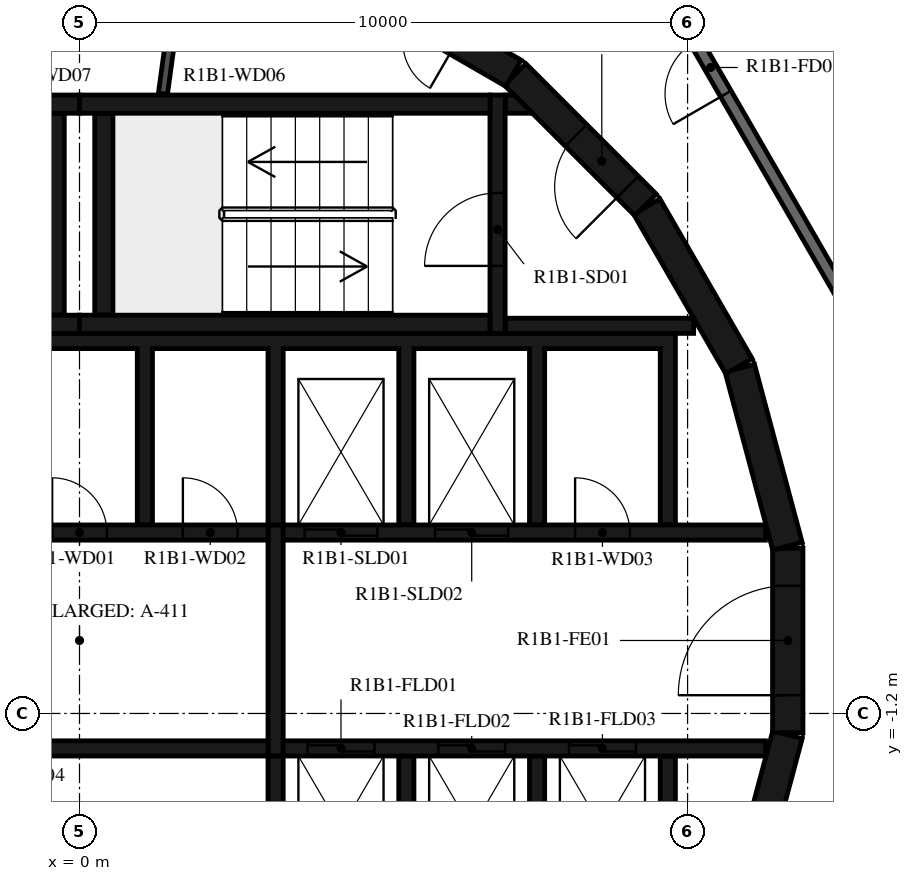
"""IFC4 building model, lengths in metres.
Left out: names, types, materials, properties, quantities, classifications, styles, units other than length and angle.
Written with IfcOpenShell. Run it as: python <this file> out.ifc"""

import sys

from ifc_helpers import new_model, si_unit, direction, frame, frame_2d, origin, place, context, subcontext, project, spatial, polyline, rectangle, outline, extrude, element, fill, save


model = new_model("IFC4")
c1 = context("Model", 3, precision=1e-05, world=origin(), true_north=direction((0.0, 1.0)))
c2 = subcontext(c1, "Body", "Model", "MODEL_VIEW")
j1 = project(units=[si_unit("LENGTHUNIT", "METRE"), si_unit("PLANEANGLEUNIT", "RADIAN")], contexts=[c1])
p1 = place(None, origin())
s1 = spatial("IfcSite", under=j1, at=p1, CompositionType="ELEMENT")
p2 = place(p1, origin())
s2 = spatial("IfcBuilding", under=s1, at=p2, CompositionType="ELEMENT")
p3 = place(p2, frame((0.0, 0.0, 48.9)))
s3 = spatial("IfcBuildingStorey", under=s2, at=p3, CompositionType="ELEMENT", Elevation=48.9)
p4 = place(p3, frame((10.858, -4.479, 0.0), z_axis=(0.0, 0.0, 1.0), x_axis=(0.258734743916, 0.965948410781, 0.0)))
e1 = element("IfcWall", 1, at=p4, inside=s3, PredefinedType="SHEAR", context=c2, shape_type="SweptSolid", body=[
    extrude(rectangle(XDim=3.033, YDim=0.5, at=frame_2d((1.516, 0.0))), origin(), (0.0, 0.0, 1.0), 3.12),
])
p5 = place(p3, frame((11.647, -1.516, 0.0), z_axis=(0.0, 0.0, 1.0), x_axis=(0.0, 1.0, 0.0)))
e2 = element("IfcWall", 2, at=p5, inside=s3, PredefinedType="SHEAR", context=c2, shape_type="SweptSolid", body=[
    extrude(rectangle(XDim=3.033, YDim=0.5, at=frame_2d((1.516, 0.0))), origin(), (0.0, 0.0, 1.0), 3.12),
])
p6 = place(p5, frame((0.616, 0.0, 0.0)))
e3 = element("IfcOpeningElement", 3, at=p6, cuts=e2, PredefinedType="OPENING", context=c2, shape_type="SweptSolid", body=[
    extrude(rectangle(XDim=1.8, YDim=2.1, at=frame_2d((0.9, 1.05))), frame((0.0, 0.26, 0.0), z_axis=(0.0, -1.0, 0.0), x_axis=(1.0, 0.0, 0.0)), (0.0, 0.0, 1.0), 0.52),
])
for number, where, z_axis, x_axis in (
    (4, (11.643, 1.55, 0.0), (0.0, 0.0, 1.0), (-0.259, 0.966, 0.0)),
    (5, (10.845, 4.51, 0.0), (0.0, 0.0, 1.0), (-0.5, 0.866, 0.0)),
):
    element("IfcWall", number, at=place(p3, frame(where, z_axis=z_axis, x_axis=x_axis)), inside=s3, PredefinedType="SHEAR", context=c2, shape_type="SweptSolid", body=[
        extrude(rectangle(XDim=3.033, YDim=0.5, at=frame_2d((1.516, 0.0))), origin(), (0.0, 0.0, 1.0), 3.12),
    ])
p7 = place(p3, frame((9.308, 7.164, 0.0), z_axis=(0.0, 0.0, 1.0), x_axis=(-0.707106781187, 0.707106781187, 0.0)))
e6 = element("IfcWall", 6, at=p7, inside=s3, PredefinedType="SHEAR", context=c2, shape_type="SweptSolid", body=[
    extrude(rectangle(XDim=3.032, YDim=0.5, at=frame_2d((1.516, 0.0))), origin(), (0.0, 0.0, 1.0), 3.12),
])
p8 = place(p7, frame((0.416, 0.0, 0.0)))
e7 = element("IfcOpeningElement", 7, at=p8, cuts=e6, PredefinedType="OPENING", context=c2, shape_type="SweptSolid", body=[
    extrude(rectangle(XDim=1.2, YDim=2.1, at=frame_2d((0.6, 1.05))), frame((0.0, 0.26, 0.0), z_axis=(0.0, -1.0, 0.0), x_axis=(1.0, 0.0, 0.0)), (0.0, 0.0, 1.0), 0.52),
])
p9 = place(p3, frame((7.137, 9.329, 0.0), z_axis=(0.0, 0.0, 1.0), x_axis=(-0.865975092491, 0.500087131594, 0.0)))
e8 = element("IfcWall", 8, at=p9, inside=s3, PredefinedType="SHEAR", context=c2, shape_type="SweptSolid", body=[
    extrude(rectangle(XDim=3.033, YDim=0.5, at=frame_2d((1.516, 0.0))), origin(), (0.0, 0.0, 1.0), 3.12),
])
p10 = place(p9, frame((1.066, 0.0, 0.0)))
e9 = element("IfcOpeningElement", 9, at=p10, cuts=e8, PredefinedType="OPENING", context=c2, shape_type="SweptSolid", body=[
    extrude(rectangle(XDim=0.9, YDim=2.1, at=frame_2d((0.45, 1.05))), frame((0.0, 0.26, 0.0), z_axis=(0.0, -1.0, 0.0), x_axis=(1.0, 0.0, 0.0)), (0.0, 0.0, 1.0), 0.52),
])
for number, where, z_axis, x_axis in (
    (10, (0.0, 5.2, 0.0), (0.0, 0.0, 1.0), (1.0, 0.0, 0.0)),
    (11, (0.0, 8.82, 0.0), (0.0, 0.0, 1.0), (1.0, 0.0, 0.0)),
):
    element("IfcWall", number, at=place(p3, frame(where, z_axis=z_axis, x_axis=x_axis)), inside=s3, PredefinedType="SHEAR", context=c2, shape_type="SweptSolid", body=[
        extrude(rectangle(XDim=6.75, YDim=0.3, at=frame_2d((3.375, 0.0))), origin(), (0.0, 0.0, 1.0), 3.12),
    ])
p11 = place(p3, frame((0.4, 5.35, 0.0), z_axis=(0.0, 0.0, 1.0), x_axis=(0.0, 1.0, 0.0)))
e12 = element("IfcWall", 12, at=p11, inside=s3, PredefinedType="SHEAR", context=c2, shape_type="SweptSolid", body=[
    extrude(rectangle(XDim=3.32, YDim=0.3, at=frame_2d((1.66, 0.0))), origin(), (0.0, 0.0, 1.0), 3.12),
])
p12 = place(p3, frame((6.875, 5.05, 0.0), z_axis=(0.0, 0.0, 1.0), x_axis=(0.0, 1.0, 0.0)))
e13 = element("IfcWall", 13, at=p12, inside=s3, PredefinedType="SHEAR", context=c2, shape_type="SweptSolid", body=[
    extrude(rectangle(XDim=3.92, YDim=0.25, at=frame_2d((1.96, 0.0))), origin(), (0.0, 0.0, 1.0), 3.12),
])
p13 = place(p12, frame((1.11, 0.0, 0.0)))
e14 = element("IfcOpeningElement", 14, at=p13, cuts=e13, PredefinedType="OPENING", context=c2, shape_type="SweptSolid", body=[
    extrude(rectangle(XDim=1.2, YDim=2.1, at=frame_2d((0.6, 1.05))), frame((0.0, 0.135, 0.0), z_axis=(0.0, -1.0, 0.0), x_axis=(1.0, 0.0, 0.0)), (0.0, 0.0, 1.0), 0.27),
])
p14 = place(p3, frame((7.0, 5.175, 0.0), z_axis=(0.0, 0.0, 1.0), x_axis=(1.0, 0.0, 0.0)))
e15 = element("IfcWall", 15, at=p14, inside=s3, PredefinedType="SHEAR", context=c2, shape_type="SweptSolid", body=[
    extrude(rectangle(XDim=3.1, YDim=0.25, at=frame_2d((1.55, 0.0))), origin(), (0.0, 0.0, 1.0), 3.12),
])
p15 = place(p3, origin())
e16 = element("IfcWall", 16, at=p15, inside=s3, PredefinedType="SHEAR", context=c2, shape_type="SweptSolid", body=[
    extrude(outline(polyline([(7.448, 8.67), (7.0, 8.67), (7.0, 8.97), (7.148, 8.97), (7.448, 8.67)])), origin(), (0.0, 0.0, 1.0), 3.12),
])
for number, where, z_axis, x_axis in (
    (17, (-6.75, 5.2, 0.0), (0.0, 0.0, 1.0), (1.0, 0.0, 0.0)),
    (18, (-6.75, 8.82, 0.0), (0.0, 0.0, 1.0), (1.0, 0.0, 0.0)),
):
    element("IfcWall", number, at=place(p3, frame(where, z_axis=z_axis, x_axis=x_axis)), inside=s3, PredefinedType="SHEAR", context=c2, shape_type="SweptSolid", body=[
        extrude(rectangle(XDim=6.75, YDim=0.3, at=frame_2d((3.375, 0.0))), origin(), (0.0, 0.0, 1.0), 3.12),
    ])
p16 = place(p3, frame((-0.4, 5.35, 0.0), z_axis=(0.0, 0.0, 1.0), x_axis=(0.0, 1.0, 0.0)))
e19 = element("IfcWall", 19, at=p16, inside=s3, PredefinedType="SHEAR", context=c2, shape_type="SweptSolid", body=[
    extrude(rectangle(XDim=3.32, YDim=0.3, at=frame_2d((1.66, 0.0))), origin(), (0.0, 0.0, 1.0), 3.12),
])
p17 = place(p3, origin())
e20 = element("IfcWall", 20, at=p17, inside=s3, PredefinedType="SHEAR", context=c2, shape_type="SweptSolid", body=[
    extrude(outline(polyline([(-9.55, 4.8), (-7.65, 4.8), (-7.65, 1.9), (-7.4, 1.9), (-7.4, 4.8), (-5.5, 4.8), (-5.5, 1.9), (-5.25, 1.9), (-5.25, 4.8), (-3.35, 4.8), (-3.35, 1.9), (-3.1, 1.9), (-3.1, 4.8), (-1.2, 4.8), (-1.2, 1.9), (-0.95, 1.9), (-0.95, 4.8), (0.95, 4.8), (0.95, 1.9), (1.2, 1.9), (1.2, 4.8), (3.1, 4.8), (3.1, 1.9), (3.35, 1.9), (3.35, 4.8), (5.25, 4.8), (5.25, 1.9), (5.5, 1.9), (5.5, 4.8), (7.4, 4.8), (7.4, 1.9), (7.65, 1.9), (7.65, 4.8), (9.55, 4.8), (9.55, 1.9), (9.8, 1.9), (9.8, 4.8), (9.8, 5.05), (-9.8, 5.05), (-9.8, 4.8), (-9.8, 1.9), (-9.55, 1.9), (-9.55, 4.8)])), origin(), (0.0, 0.0, 1.0), 3.12),
])
p18 = place(p3, origin())
e21 = element("IfcWall", 21, at=p18, inside=s3, PredefinedType="SHEAR", context=c2, shape_type="SweptSolid", body=[
    extrude(outline(polyline([(9.8, -5.05), (9.8, -4.8), (9.8, -1.9), (9.55, -1.9), (9.55, -4.8), (7.65, -4.8), (7.65, -1.9), (7.4, -1.9), (7.4, -4.8), (5.5, -4.8), (5.5, -1.9), (5.25, -1.9), (5.25, -4.8), (3.35, -4.8), (3.35, -1.9), (3.1, -1.9), (3.1, -4.8), (-5.25, -4.8), (-5.25, -1.9), (-5.5, -1.9), (-5.5, -4.8), (-7.4, -4.8), (-7.4, -1.9), (-7.65, -1.9), (-7.65, -4.8), (-9.55, -4.8), (-9.55, -1.9), (-9.8, -1.9), (-9.8, -4.8), (-9.8, -5.05), (9.8, -5.05)])), origin(), (0.0, 0.0, 1.0), 3.12),
])
p19 = place(p3, frame((-11.28, 1.775, 0.0), z_axis=(0.0, 0.0, 1.0), x_axis=(1.0, 0.0, 0.0)))
e22 = element("IfcWall", 22, at=p19, inside=s3, PredefinedType="SHEAR", context=c2, shape_type="SweptSolid", body=[
    extrude(rectangle(XDim=14.38, YDim=0.25, at=frame_2d((7.19, 0.0))), origin(), (0.0, 0.0, 1.0), 3.12),
])
p20 = place(p19, frame((2.13, 0.0, 0.0)))
e23 = element("IfcOpeningElement", 23, at=p20, cuts=e22, PredefinedType="OPENING", context=c2, shape_type="SweptSolid", body=[
    extrude(rectangle(XDim=1.1, YDim=2.1, at=frame_2d((0.55, 1.05))), frame((0.0, 0.135, 0.0), z_axis=(0.0, -1.0, 0.0), x_axis=(1.0, 0.0, 0.0)), (0.0, 0.0, 1.0), 0.27),
])
p21 = place(p19, frame((4.28, 0.0, 0.0)))
e24 = element("IfcOpeningElement", 24, at=p21, cuts=e22, PredefinedType="OPENING", context=c2, shape_type="SweptSolid", body=[
    extrude(rectangle(XDim=1.1, YDim=2.1, at=frame_2d((0.55, 1.05))), frame((0.0, 0.135, 0.0), z_axis=(0.0, -1.0, 0.0), x_axis=(1.0, 0.0, 0.0)), (0.0, 0.0, 1.0), 0.27),
])
p22 = place(p19, frame((6.43, 0.0, 0.0)))
e25 = element("IfcOpeningElement", 25, at=p22, cuts=e22, PredefinedType="OPENING", context=c2, shape_type="SweptSolid", body=[
    extrude(rectangle(XDim=1.1, YDim=2.1, at=frame_2d((0.55, 1.05))), frame((0.0, 0.135, 0.0), z_axis=(0.0, -1.0, 0.0), x_axis=(1.0, 0.0, 0.0)), (0.0, 0.0, 1.0), 0.27),
])
p23 = place(p19, frame((8.58, 0.0, 0.0)))
e26 = element("IfcOpeningElement", 26, at=p23, cuts=e22, PredefinedType="OPENING", context=c2, shape_type="SweptSolid", body=[
    extrude(rectangle(XDim=1.1, YDim=2.1, at=frame_2d((0.55, 1.05))), frame((0.0, 0.135, 0.0), z_axis=(0.0, -1.0, 0.0), x_axis=(1.0, 0.0, 0.0)), (0.0, 0.0, 1.0), 0.27),
])
p24 = place(p19, frame((10.83, 0.0, 0.0)))
e27 = element("IfcOpeningElement", 27, at=p24, cuts=e22, PredefinedType="OPENING", context=c2, shape_type="SweptSolid", body=[
    extrude(rectangle(XDim=0.9, YDim=2.1, at=frame_2d((0.45, 1.05))), frame((0.0, 0.135, 0.0), z_axis=(0.0, -1.0, 0.0), x_axis=(1.0, 0.0, 0.0)), (0.0, 0.0, 1.0), 0.27),
])
p25 = place(p19, frame((12.98, 0.0, 0.0)))
e28 = element("IfcOpeningElement", 28, at=p25, cuts=e22, PredefinedType="OPENING", context=c2, shape_type="SweptSolid", body=[
    extrude(rectangle(XDim=0.9, YDim=2.1, at=frame_2d((0.45, 1.05))), frame((0.0, 0.135, 0.0), z_axis=(0.0, -1.0, 0.0), x_axis=(1.0, 0.0, 0.0)), (0.0, 0.0, 1.0), 0.27),
])
p26 = place(p3, frame((3.35, 1.775, 0.0), z_axis=(0.0, 0.0, 1.0), x_axis=(1.0, 0.0, 0.0)))
e29 = element("IfcWall", 29, at=p26, inside=s3, PredefinedType="SHEAR", context=c2, shape_type="SweptSolid", body=[
    extrude(rectangle(XDim=7.93, YDim=0.25, at=frame_2d((3.965, 0.0))), origin(), (0.0, 0.0, 1.0), 3.12),
])
p27 = place(p26, frame((0.35, 0.0, 0.0)))
e30 = element("IfcOpeningElement", 30, at=p27, cuts=e29, PredefinedType="OPENING", context=c2, shape_type="SweptSolid", body=[
    extrude(rectangle(XDim=1.2, YDim=2.4, at=frame_2d((0.6, 1.2))), frame((0.0, 0.135, 0.0), z_axis=(0.0, -1.0, 0.0), x_axis=(1.0, 0.0, 0.0)), (0.0, 0.0, 1.0), 0.27),
])
p28 = place(p26, frame((2.5, 0.0, 0.0)))
e31 = element("IfcOpeningElement", 31, at=p28, cuts=e29, PredefinedType="OPENING", context=c2, shape_type="SweptSolid", body=[
    extrude(rectangle(XDim=1.2, YDim=2.4, at=frame_2d((0.6, 1.2))), frame((0.0, 0.135, 0.0), z_axis=(0.0, -1.0, 0.0), x_axis=(1.0, 0.0, 0.0)), (0.0, 0.0, 1.0), 0.27),
])
p29 = place(p26, frame((4.8, 0.0, 0.0)))
e32 = element("IfcOpeningElement", 32, at=p29, cuts=e29, PredefinedType="OPENING", context=c2, shape_type="SweptSolid", body=[
    extrude(rectangle(XDim=0.9, YDim=2.1, at=frame_2d((0.45, 1.05))), frame((0.0, 0.135, 0.0), z_axis=(0.0, -1.0, 0.0), x_axis=(1.0, 0.0, 0.0)), (0.0, 0.0, 1.0), 0.27),
])
p30 = place(p3, frame((-11.28, -1.775, 0.0), z_axis=(0.0, 0.0, 1.0), x_axis=(1.0, 0.0, 0.0)))
e33 = element("IfcWall", 33, at=p30, inside=s3, PredefinedType="SHEAR", context=c2, shape_type="SweptSolid", body=[
    extrude(rectangle(XDim=14.38, YDim=0.25, at=frame_2d((7.19, 0.0))), origin(), (0.0, 0.0, 1.0), 3.12),
])
p31 = place(p30, frame((9.755, 0.0, 0.0)))
e34 = element("IfcOpeningElement", 34, at=p31, cuts=e33, PredefinedType="OPENING", context=c2, shape_type="SweptSolid", body=[
    extrude(rectangle(XDim=0.9, YDim=2.1, at=frame_2d((0.45, 1.05))), frame((0.0, 0.135, 0.0), z_axis=(0.0, -1.0, 0.0), x_axis=(1.0, 0.0, 0.0)), (0.0, 0.0, 1.0), 0.27),
])
p32 = place(p3, frame((3.35, -1.775, 0.0), z_axis=(0.0, 0.0, 1.0), x_axis=(1.0, 0.0, 0.0)))
e35 = element("IfcWall", 35, at=p32, inside=s3, PredefinedType="SHEAR", context=c2, shape_type="SweptSolid", body=[
    extrude(rectangle(XDim=7.93, YDim=0.25, at=frame_2d((3.965, 0.0))), origin(), (0.0, 0.0, 1.0), 3.12),
])
p33 = place(p32, frame((0.4, 0.0, 0.0)))
e36 = element("IfcOpeningElement", 36, at=p33, cuts=e35, PredefinedType="OPENING", context=c2, shape_type="SweptSolid", body=[
    extrude(rectangle(XDim=1.1, YDim=2.4, at=frame_2d((0.55, 1.2))), frame((0.0, 0.135, 0.0), z_axis=(0.0, -1.0, 0.0), x_axis=(1.0, 0.0, 0.0)), (0.0, 0.0, 1.0), 0.27),
])
p34 = place(p32, frame((2.55, 0.0, 0.0)))
e37 = element("IfcOpeningElement", 37, at=p34, cuts=e35, PredefinedType="OPENING", context=c2, shape_type="SweptSolid", body=[
    extrude(rectangle(XDim=1.1, YDim=2.4, at=frame_2d((0.55, 1.2))), frame((0.0, 0.135, 0.0), z_axis=(0.0, -1.0, 0.0), x_axis=(1.0, 0.0, 0.0)), (0.0, 0.0, 1.0), 0.27),
])
p35 = place(p32, frame((4.7, 0.0, 0.0)))
e38 = element("IfcOpeningElement", 38, at=p35, cuts=e35, PredefinedType="OPENING", context=c2, shape_type="SweptSolid", body=[
    extrude(rectangle(XDim=1.1, YDim=2.4, at=frame_2d((0.55, 1.2))), frame((0.0, 0.135, 0.0), z_axis=(0.0, -1.0, 0.0), x_axis=(1.0, 0.0, 0.0)), (0.0, 0.0, 1.0), 0.27),
])
p36 = place(p3, frame((3.225, -1.9, 0.0), z_axis=(0.0, 0.0, 1.0), x_axis=(0.0, 1.0, 0.0)))
e39 = element("IfcWall", 39, at=p36, inside=s3, PredefinedType="SHEAR", context=c2, shape_type="SweptSolid", body=[
    extrude(rectangle(XDim=3.8, YDim=0.25, at=frame_2d((1.9, 0.0))), origin(), (0.0, 0.0, 1.0), 3.12),
])
p37 = place(p3, frame((1.691, 11.326, 0.0), z_axis=(0.0, 0.0, 1.0), x_axis=(-0.135344253201, -0.990798633994, 0.0)))
e40 = element("IfcWall", 40, at=p37, inside=s3, PredefinedType="PARTITIONING", context=c2, shape_type="SweptSolid", body=[
    extrude(rectangle(XDim=2.358, YDim=0.15, at=frame_2d((1.179, 0.0))), origin(), (0.0, 0.0, 1.0), 3.12),
])
p38 = place(p37, frame((0.729, 0.0, 0.0)))
e41 = element("IfcOpeningElement", 41, at=p38, cuts=e40, PredefinedType="OPENING", context=c2, shape_type="SweptSolid", body=[
    extrude(rectangle(XDim=0.9, YDim=2.1, at=frame_2d((0.45, 1.05))), frame((0.0, 0.085, 0.0), z_axis=(0.0, -1.0, 0.0), x_axis=(1.0, 0.0, 0.0)), (0.0, 0.0, 1.0), 0.17),
])
p39 = place(p3, frame((13.7, 3.671, 0.0), z_axis=(0.0, 0.0, 1.0), x_axis=(-0.500001669485, 0.866024439905, 0.0)))
e42 = element("IfcWall", 42, at=p39, inside=s3, PredefinedType="STANDARD", context=c2, shape_type="SweptSolid", body=[
    extrude(rectangle(XDim=7.342, YDim=0.2, at=frame_2d((3.671, 0.0))), origin(), (0.0, 0.0, 1.0), 3.12),
])
p40 = place(p39, frame((6.142, 0.0, 0.0)))
e43 = element("IfcOpeningElement", 43, at=p40, cuts=e42, PredefinedType="OPENING", context=c2, shape_type="SweptSolid", body=[
    extrude(rectangle(XDim=1.0, YDim=2.1, at=frame_2d((0.5, 1.05))), frame((0.0, 0.11, 0.0), z_axis=(0.0, -1.0, 0.0), x_axis=(1.0, 0.0, 0.0)), (0.0, 0.0, 1.0), 0.22),
])
p41 = place(p13, origin())
e44 = element("IfcDoor", 44, at=p41, inside=s3, OperationType="SINGLE_SWING_LEFT", PredefinedType="DOOR", context=c2, shape_type="SweptSolid", body=[
    extrude(rectangle(XDim=1.2, YDim=2.1, at=frame_2d((0.6, 1.05))), frame((0.0, 0.025, 0.0), z_axis=(0.0, -1.0, 0.0), x_axis=(1.0, 0.0, 0.0)), (0.0, 0.0, 1.0), 0.05),
])
fill(e14, e44)
p42 = place(p8, origin())
e45 = element("IfcDoor", 45, at=p42, inside=s3, OperationType="SINGLE_SWING_RIGHT", PredefinedType="DOOR", context=c2, shape_type="SweptSolid", body=[
    extrude(rectangle(XDim=1.2, YDim=2.1, at=frame_2d((0.6, 1.05))), frame((0.0, 0.025, 0.0), z_axis=(0.0, -1.0, 0.0), x_axis=(1.0, 0.0, 0.0)), (0.0, 0.0, 1.0), 0.05),
])
fill(e7, e45)
p43 = place(p6, origin())
e46 = element("IfcDoor", 46, at=p43, inside=s3, OperationType="DOUBLE_DOOR_SINGLE_SWING", PredefinedType="DOOR", context=c2, shape_type="SweptSolid", body=[
    extrude(rectangle(XDim=1.8, YDim=2.1, at=frame_2d((0.9, 1.05))), frame((0.0, 0.025, 0.0), z_axis=(0.0, -1.0, 0.0), x_axis=(1.0, 0.0, 0.0)), (0.0, 0.0, 1.0), 0.05),
])
fill(e3, e46)
p44 = place(p27, origin())
e47 = element("IfcDoor", 47, at=p44, inside=s3, OperationType="DOUBLE_DOOR_SLIDING", PredefinedType="DOOR", context=c2, shape_type="SweptSolid", body=[
    extrude(rectangle(XDim=1.2, YDim=2.4, at=frame_2d((0.6, 1.2))), frame((0.0, 0.025, 0.0), z_axis=(0.0, -1.0, 0.0), x_axis=(1.0, 0.0, 0.0)), (0.0, 0.0, 1.0), 0.05),
])
fill(e30, e47)
p45 = place(p28, origin())
e48 = element("IfcDoor", 48, at=p45, inside=s3, OperationType="DOUBLE_DOOR_SLIDING", PredefinedType="DOOR", context=c2, shape_type="SweptSolid", body=[
    extrude(rectangle(XDim=1.2, YDim=2.4, at=frame_2d((0.6, 1.2))), frame((0.0, 0.025, 0.0), z_axis=(0.0, -1.0, 0.0), x_axis=(1.0, 0.0, 0.0)), (0.0, 0.0, 1.0), 0.05),
])
fill(e31, e48)
p46 = place(p33, origin())
e49 = element("IfcDoor", 49, at=p46, inside=s3, OperationType="DOUBLE_DOOR_SLIDING", PredefinedType="DOOR", context=c2, shape_type="SweptSolid", body=[
    extrude(rectangle(XDim=1.1, YDim=2.4, at=frame_2d((0.55, 1.2))), frame((0.0, 0.025, 0.0), z_axis=(0.0, -1.0, 0.0), x_axis=(1.0, 0.0, 0.0)), (0.0, 0.0, 1.0), 0.05),
])
fill(e36, e49)
p47 = place(p34, origin())
e50 = element("IfcDoor", 50, at=p47, inside=s3, OperationType="DOUBLE_DOOR_SLIDING", PredefinedType="DOOR", context=c2, shape_type="SweptSolid", body=[
    extrude(rectangle(XDim=1.1, YDim=2.4, at=frame_2d((0.55, 1.2))), frame((0.0, 0.025, 0.0), z_axis=(0.0, -1.0, 0.0), x_axis=(1.0, 0.0, 0.0)), (0.0, 0.0, 1.0), 0.05),
])
fill(e37, e50)
p48 = place(p35, origin())
e51 = element("IfcDoor", 51, at=p48, inside=s3, OperationType="DOUBLE_DOOR_SLIDING", PredefinedType="DOOR", context=c2, shape_type="SweptSolid", body=[
    extrude(rectangle(XDim=1.1, YDim=2.4, at=frame_2d((0.55, 1.2))), frame((0.0, 0.025, 0.0), z_axis=(0.0, -1.0, 0.0), x_axis=(1.0, 0.0, 0.0)), (0.0, 0.0, 1.0), 0.05),
])
fill(e38, e51)
p49 = place(p24, origin())
e52 = element("IfcDoor", 52, at=p49, inside=s3, OperationType="SINGLE_SWING_RIGHT", PredefinedType="DOOR", context=c2, shape_type="SweptSolid", body=[
    extrude(rectangle(XDim=0.9, YDim=2.1, at=frame_2d((0.45, 1.05))), frame((0.0, 0.025, 0.0), z_axis=(0.0, -1.0, 0.0), x_axis=(1.0, 0.0, 0.0)), (0.0, 0.0, 1.0), 0.05),
])
fill(e27, e52)
p50 = place(p25, origin())
e53 = element("IfcDoor", 53, at=p50, inside=s3, OperationType="SINGLE_SWING_LEFT", PredefinedType="DOOR", context=c2, shape_type="SweptSolid", body=[
    extrude(rectangle(XDim=0.9, YDim=2.1, at=frame_2d((0.45, 1.05))), frame((0.0, 0.025, 0.0), z_axis=(0.0, -1.0, 0.0), x_axis=(1.0, 0.0, 0.0)), (0.0, 0.0, 1.0), 0.05),
])
fill(e28, e53)
p51 = place(p29, origin())
e54 = element("IfcDoor", 54, at=p51, inside=s3, OperationType="SINGLE_SWING_RIGHT", PredefinedType="DOOR", context=c2, shape_type="SweptSolid", body=[
    extrude(rectangle(XDim=0.9, YDim=2.1, at=frame_2d((0.45, 1.05))), frame((0.0, 0.025, 0.0), z_axis=(0.0, -1.0, 0.0), x_axis=(1.0, 0.0, 0.0)), (0.0, 0.0, 1.0), 0.05),
])
fill(e32, e54)
p52 = place(p40, origin())
e55 = element("IfcDoor", 55, at=p52, inside=s3, OperationType="SINGLE_SWING_RIGHT", PredefinedType="DOOR", context=c2, shape_type="SweptSolid", body=[
    extrude(rectangle(XDim=1.0, YDim=2.1, at=frame_2d((0.5, 1.05))), frame((0.0, 0.025, 0.0), z_axis=(0.0, -1.0, 0.0), x_axis=(1.0, 0.0, 0.0)), (0.0, 0.0, 1.0), 0.05),
])
fill(e43, e55)
save(model, sys.argv[1])
